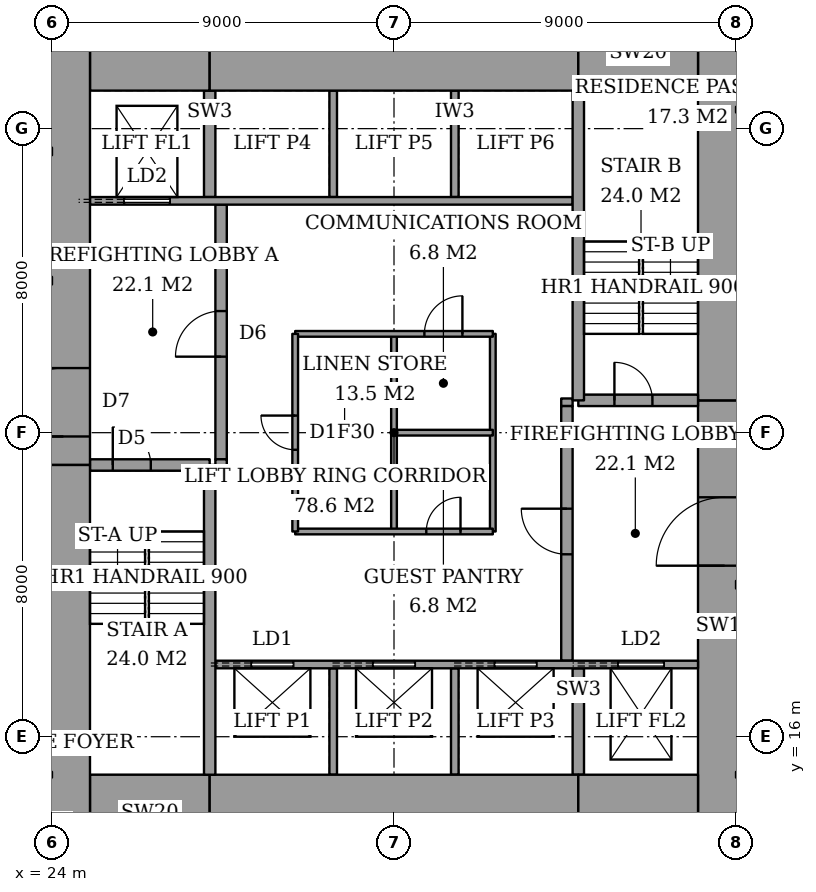
"""IFC4 building model, lengths in metres.
Left out: names, types, materials, properties, quantities, classifications, styles, units other than length and angle.
Written with IfcOpenShell. Run it as: python <this file> out.ifc"""

import sys

from ifc_helpers import new_model, si_unit, direction, frame, frame_2d, origin, place, context, subcontext, project, spatial, rectangle, extrude, element, fill, save


model = new_model("IFC4")
c1 = context("Model", 3, precision=1e-05, world=origin(), true_north=direction((0.0, 1.0)))
c2 = subcontext(c1, "Body", "Model", "MODEL_VIEW")
j1 = project(units=[si_unit("LENGTHUNIT", "METRE"), si_unit("PLANEANGLEUNIT", "RADIAN")], contexts=[c1])
p1 = place(None, origin())
s1 = spatial("IfcSite", under=j1, at=p1, CompositionType="ELEMENT")
p2 = place(p1, origin())
s2 = spatial("IfcBuilding", under=s1, at=p2, CompositionType="ELEMENT")
p3 = place(p2, frame((0.0, 0.0, 72.8)))
s3 = spatial("IfcBuildingStorey", under=s2, at=p3, CompositionType="ELEMENT", Elevation=72.8)
p4 = place(p3, frame((25.0, 14.0, 0.0), z_axis=(0.0, 0.0, 1.0), x_axis=(1.0, 0.0, 0.0)))
e1 = element("IfcWall", 1, at=p4, inside=s3, PredefinedType="SHEAR", context=c2, shape_type="SweptSolid", body=[
    extrude(rectangle(XDim=3.15, YDim=2.0, at=frame_2d((1.575, 0.0))), origin(), (0.0, 0.0, 1.0), 3.6),
])
p5 = place(p3, frame((28.15, 14.0, 0.0), z_axis=(0.0, 0.0, 1.0), x_axis=(1.0, 0.0, 0.0)))
e2 = element("IfcWall", 2, at=p5, inside=s3, PredefinedType="SHEAR", context=c2, shape_type="SweptSolid", body=[
    extrude(rectangle(XDim=9.7, YDim=2.0, at=frame_2d((4.85, 0.0))), origin(), (0.0, 0.0, 1.0), 3.6),
])
for number, where, z_axis, x_axis in (
    (3, (37.85, 14.0, 0.0), (0.0, 0.0, 1.0), (1.0, 0.0, 0.0)),
    (4, (25.0, 34.0, 0.0), (0.0, 0.0, 1.0), (1.0, 0.0, 0.0)),
):
    element("IfcWall", number, at=place(p3, frame(where, z_axis=z_axis, x_axis=x_axis)), inside=s3, PredefinedType="SHEAR", context=c2, shape_type="SweptSolid", body=[
        extrude(rectangle(XDim=3.15, YDim=2.0, at=frame_2d((1.575, 0.0))), origin(), (0.0, 0.0, 1.0), 3.6),
    ])
p6 = place(p3, frame((28.15, 34.0, 0.0), z_axis=(0.0, 0.0, 1.0), x_axis=(1.0, 0.0, 0.0)))
e5 = element("IfcWall", 5, at=p6, inside=s3, PredefinedType="SHEAR", context=c2, shape_type="SweptSolid", body=[
    extrude(rectangle(XDim=9.7, YDim=2.0, at=frame_2d((4.85, 0.0))), origin(), (0.0, 0.0, 1.0), 3.6),
])
p7 = place(p3, frame((37.85, 34.0, 0.0), z_axis=(0.0, 0.0, 1.0), x_axis=(1.0, 0.0, 0.0)))
e6 = element("IfcWall", 6, at=p7, inside=s3, PredefinedType="SHEAR", context=c2, shape_type="SweptSolid", body=[
    extrude(rectangle(XDim=3.15, YDim=2.0, at=frame_2d((1.575, 0.0))), origin(), (0.0, 0.0, 1.0), 3.6),
])
p8 = place(p3, frame((24.3, 13.0, 0.0), z_axis=(0.0, 0.0, 1.0), x_axis=(0.0, 1.0, 0.0)))
e7 = element("IfcWall", 7, at=p8, inside=s3, PredefinedType="SHEAR", context=c2, shape_type="SweptSolid", body=[
    extrude(rectangle(XDim=10.15, YDim=1.4, at=frame_2d((5.075, 0.0))), origin(), (0.0, 0.0, 1.0), 3.6),
])
p9 = place(p3, frame((24.3, 23.15, 0.0), z_axis=(0.0, 0.0, 1.0), x_axis=(0.0, 1.0, 0.0)))
e8 = element("IfcWall", 8, at=p9, inside=s3, PredefinedType="SHEAR", context=c2, shape_type="SweptSolid", body=[
    extrude(rectangle(XDim=11.85, YDim=1.4, at=frame_2d((5.925, 0.0))), origin(), (0.0, 0.0, 1.0), 3.6),
])
p10 = place(p9, frame((0.75, 0.0, 0.0)))
e9 = element("IfcOpeningElement", 9, at=p10, cuts=e8, PredefinedType="OPENING", context=c2, shape_type="SweptSolid", body=[
    extrude(rectangle(XDim=1.8, YDim=2.4, at=frame_2d((0.9, 1.2))), frame((0.0, 0.71, 0.0), z_axis=(0.0, -1.0, 0.0), x_axis=(1.0, 0.0, 0.0)), (0.0, 0.0, 1.0), 1.42),
])
p11 = place(p3, frame((41.7, 13.0, 0.0), z_axis=(0.0, 0.0, 1.0), x_axis=(0.0, 1.0, 0.0)))
e10 = element("IfcWall", 10, at=p11, inside=s3, PredefinedType="SHEAR", context=c2, shape_type="SweptSolid", body=[
    extrude(rectangle(XDim=11.85, YDim=1.4, at=frame_2d((5.925, 0.0))), origin(), (0.0, 0.0, 1.0), 3.6),
])
p12 = place(p11, frame((7.5, 0.0, 0.0)))
e11 = element("IfcOpeningElement", 11, at=p12, cuts=e10, PredefinedType="OPENING", context=c2, shape_type="SweptSolid", body=[
    extrude(rectangle(XDim=1.8, YDim=2.4, at=frame_2d((0.9, 1.2))), frame((0.0, 0.71, 0.0), z_axis=(0.0, -1.0, 0.0), x_axis=(1.0, 0.0, 0.0)), (0.0, 0.0, 1.0), 1.42),
])
p13 = place(p3, frame((41.7, 24.85, 0.0), z_axis=(0.0, 0.0, 1.0), x_axis=(0.0, 1.0, 0.0)))
e12 = element("IfcWall", 12, at=p13, inside=s3, PredefinedType="SHEAR", context=c2, shape_type="SweptSolid", body=[
    extrude(rectangle(XDim=10.15, YDim=1.4, at=frame_2d((5.075, 0.0))), origin(), (0.0, 0.0, 1.0), 3.6),
])
p14 = place(p3, frame((28.15, 15.0, 0.0), z_axis=(0.0, 0.0, 1.0), x_axis=(0.0, 1.0, 0.0)))
e13 = element("IfcWall", 13, at=p14, inside=s3, PredefinedType="SHEAR", context=c2, shape_type="SweptSolid", body=[
    extrude(rectangle(XDim=8.15, YDim=0.3, at=frame_2d((4.075, 0.0))), origin(), (0.0, 0.0, 1.0), 3.6),
])
p15 = place(p3, frame((25.0, 23.15, 0.0), z_axis=(0.0, 0.0, 1.0), x_axis=(1.0, 0.0, 0.0)))
e14 = element("IfcWall", 14, at=p15, inside=s3, PredefinedType="SHEAR", context=c2, shape_type="SweptSolid", body=[
    extrude(rectangle(XDim=3.15, YDim=0.3, at=frame_2d((1.575, 0.0))), origin(), (0.0, 0.0, 1.0), 3.6),
])
p16 = place(p15, frame((0.6, 0.0, 0.0)))
e15 = element("IfcOpeningElement", 15, at=p16, cuts=e14, PredefinedType="OPENING", context=c2, shape_type="SweptSolid", body=[
    extrude(rectangle(XDim=1.0, YDim=2.1, at=frame_2d((0.5, 1.05))), frame((0.0, 0.16, 0.0), z_axis=(0.0, -1.0, 0.0), x_axis=(1.0, 0.0, 0.0)), (0.0, 0.0, 1.0), 0.32),
])
p17 = place(p3, frame((37.85, 24.85, 0.0), z_axis=(0.0, 0.0, 1.0), x_axis=(0.0, 1.0, 0.0)))
e16 = element("IfcWall", 16, at=p17, inside=s3, PredefinedType="SHEAR", context=c2, shape_type="SweptSolid", body=[
    extrude(rectangle(XDim=8.15, YDim=0.3, at=frame_2d((4.075, 0.0))), origin(), (0.0, 0.0, 1.0), 3.6),
])
p18 = place(p3, frame((37.85, 24.85, 0.0), z_axis=(0.0, 0.0, 1.0), x_axis=(1.0, 0.0, 0.0)))
e17 = element("IfcWall", 17, at=p18, inside=s3, PredefinedType="SHEAR", context=c2, shape_type="SweptSolid", body=[
    extrude(rectangle(XDim=3.15, YDim=0.3, at=frame_2d((1.575, 0.0))), origin(), (0.0, 0.0, 1.0), 3.6),
])
p19 = place(p18, frame((0.95, 0.0, 0.0)))
e18 = element("IfcOpeningElement", 18, at=p19, cuts=e17, PredefinedType="OPENING", context=c2, shape_type="SweptSolid", body=[
    extrude(rectangle(XDim=1.0, YDim=2.1, at=frame_2d((0.5, 1.05))), frame((0.0, 0.16, 0.0), z_axis=(0.0, -1.0, 0.0), x_axis=(1.0, 0.0, 0.0)), (0.0, 0.0, 1.0), 0.32),
])
p20 = place(p3, frame((28.45, 23.3, 0.0), z_axis=(0.0, 0.0, 1.0), x_axis=(0.0, 1.0, 0.0)))
e19 = element("IfcWall", 19, at=p20, inside=s3, PredefinedType="PARTITIONING", context=c2, shape_type="SweptSolid", body=[
    extrude(rectangle(XDim=6.7, YDim=0.3, at=frame_2d((3.35, 0.0))), origin(), (0.0, 0.0, 1.0), 3.6),
])
p21 = place(p20, frame((2.7, 0.0, 0.0)))
e20 = element("IfcOpeningElement", 20, at=p21, cuts=e19, PredefinedType="OPENING", context=c2, shape_type="SweptSolid", body=[
    extrude(rectangle(XDim=1.2, YDim=2.1, at=frame_2d((0.6, 1.05))), frame((0.0, 0.16, 0.0), z_axis=(0.0, -1.0, 0.0), x_axis=(1.0, 0.0, 0.0)), (0.0, 0.0, 1.0), 0.32),
])
p22 = place(p3, frame((37.55, 18.0, 0.0), z_axis=(0.0, 0.0, 1.0), x_axis=(0.0, 1.0, 0.0)))
e21 = element("IfcWall", 21, at=p22, inside=s3, PredefinedType="PARTITIONING", context=c2, shape_type="SweptSolid", body=[
    extrude(rectangle(XDim=6.7, YDim=0.3, at=frame_2d((3.35, 0.0))), origin(), (0.0, 0.0, 1.0), 3.6),
])
p23 = place(p22, frame((2.8, 0.0, 0.0)))
e22 = element("IfcOpeningElement", 22, at=p23, cuts=e21, PredefinedType="OPENING", context=c2, shape_type="SweptSolid", body=[
    extrude(rectangle(XDim=1.2, YDim=2.1, at=frame_2d((0.6, 1.05))), frame((0.0, 0.16, 0.0), z_axis=(0.0, -1.0, 0.0), x_axis=(1.0, 0.0, 0.0)), (0.0, 0.0, 1.0), 0.32),
])
p24 = place(p3, frame((28.3, 17.9, 0.0), z_axis=(0.0, 0.0, 1.0), x_axis=(1.0, 0.0, 0.0)))
e23 = element("IfcWall", 23, at=p24, inside=s3, PredefinedType="PARTITIONING", context=c2, shape_type="SweptSolid", body=[
    extrude(rectangle(XDim=12.7, YDim=0.2, at=frame_2d((6.35, 0.0))), origin(), (0.0, 0.0, 1.0), 3.6),
])
p25 = place(p24, frame((0.95, 0.0, 0.0)))
e24 = element("IfcOpeningElement", 24, at=p25, cuts=e23, PredefinedType="OPENING", context=c2, shape_type="SweptSolid", body=[
    extrude(rectangle(XDim=1.1, YDim=2.1, at=frame_2d((0.55, 1.05))), frame((0.0, 0.11, 0.0), z_axis=(0.0, -1.0, 0.0), x_axis=(1.0, 0.0, 0.0)), (0.0, 0.0, 1.0), 0.22),
])
p26 = place(p24, frame((4.15, 0.0, 0.0)))
e25 = element("IfcOpeningElement", 25, at=p26, cuts=e23, PredefinedType="OPENING", context=c2, shape_type="SweptSolid", body=[
    extrude(rectangle(XDim=1.1, YDim=2.1, at=frame_2d((0.55, 1.05))), frame((0.0, 0.11, 0.0), z_axis=(0.0, -1.0, 0.0), x_axis=(1.0, 0.0, 0.0)), (0.0, 0.0, 1.0), 0.22),
])
p27 = place(p24, frame((7.35, 0.0, 0.0)))
e26 = element("IfcOpeningElement", 26, at=p27, cuts=e23, PredefinedType="OPENING", context=c2, shape_type="SweptSolid", body=[
    extrude(rectangle(XDim=1.1, YDim=2.1, at=frame_2d((0.55, 1.05))), frame((0.0, 0.11, 0.0), z_axis=(0.0, -1.0, 0.0), x_axis=(1.0, 0.0, 0.0)), (0.0, 0.0, 1.0), 0.22),
])
p28 = place(p24, frame((10.6, 0.0, 0.0)))
e27 = element("IfcOpeningElement", 27, at=p28, cuts=e23, PredefinedType="OPENING", context=c2, shape_type="SweptSolid", body=[
    extrude(rectangle(XDim=1.2, YDim=2.1, at=frame_2d((0.6, 1.05))), frame((0.0, 0.11, 0.0), z_axis=(0.0, -1.0, 0.0), x_axis=(1.0, 0.0, 0.0)), (0.0, 0.0, 1.0), 0.22),
])
p29 = place(p3, frame((25.0, 30.1, 0.0), z_axis=(0.0, 0.0, 1.0), x_axis=(1.0, 0.0, 0.0)))
e28 = element("IfcWall", 28, at=p29, inside=s3, PredefinedType="PARTITIONING", context=c2, shape_type="SweptSolid", body=[
    extrude(rectangle(XDim=12.7, YDim=0.2, at=frame_2d((6.35, 0.0))), origin(), (0.0, 0.0, 1.0), 3.6),
])
p30 = place(p29, frame((0.9, 0.0, 0.0)))
e29 = element("IfcOpeningElement", 29, at=p30, cuts=e28, PredefinedType="OPENING", context=c2, shape_type="SweptSolid", body=[
    extrude(rectangle(XDim=1.2, YDim=2.1, at=frame_2d((0.6, 1.05))), frame((0.0, 0.11, 0.0), z_axis=(0.0, -1.0, 0.0), x_axis=(1.0, 0.0, 0.0)), (0.0, 0.0, 1.0), 0.22),
])
for number, where, z_axis, x_axis in (
    (30, (31.4, 15.0, 0.0), (0.0, 0.0, 1.0), (0.0, 1.0, 0.0)),
    (31, (34.6, 15.0, 0.0), (0.0, 0.0, 1.0), (0.0, 1.0, 0.0)),
):
    element("IfcWall", number, at=place(p3, frame(where, z_axis=z_axis, x_axis=x_axis)), inside=s3, PredefinedType="PARTITIONING", context=c2, shape_type="SweptSolid", body=[
        extrude(rectangle(XDim=2.8, YDim=0.2, at=frame_2d((1.4, 0.0))), origin(), (0.0, 0.0, 1.0), 3.6),
    ])
p31 = place(p3, frame((37.85, 15.0, 0.0), z_axis=(0.0, 0.0, 1.0), x_axis=(0.0, 1.0, 0.0)))
e32 = element("IfcWall", 32, at=p31, inside=s3, PredefinedType="SHEAR", context=c2, shape_type="SweptSolid", body=[
    extrude(rectangle(XDim=2.8, YDim=0.3, at=frame_2d((1.4, 0.0))), origin(), (0.0, 0.0, 1.0), 3.6),
])
for number, where, z_axis, x_axis in (
    (33, (31.4, 30.2, 0.0), (0.0, 0.0, 1.0), (0.0, 1.0, 0.0)),
    (34, (34.6, 30.2, 0.0), (0.0, 0.0, 1.0), (0.0, 1.0, 0.0)),
):
    element("IfcWall", number, at=place(p3, frame(where, z_axis=z_axis, x_axis=x_axis)), inside=s3, PredefinedType="PARTITIONING", context=c2, shape_type="SweptSolid", body=[
        extrude(rectangle(XDim=2.8, YDim=0.2, at=frame_2d((1.4, 0.0))), origin(), (0.0, 0.0, 1.0), 3.6),
    ])
p32 = place(p3, frame((28.15, 30.2, 0.0), z_axis=(0.0, 0.0, 1.0), x_axis=(0.0, 1.0, 0.0)))
e35 = element("IfcWall", 35, at=p32, inside=s3, PredefinedType="SHEAR", context=c2, shape_type="SweptSolid", body=[
    extrude(rectangle(XDim=2.8, YDim=0.3, at=frame_2d((1.4, 0.0))), origin(), (0.0, 0.0, 1.0), 3.6),
])
for number, where, z_axis, x_axis in (
    (36, (28.3, 23.2, 0.0), (0.0, 0.0, 1.0), (1.0, 0.0, 0.0)),
    (37, (37.4, 24.8, 0.0), (0.0, 0.0, 1.0), (1.0, 0.0, 0.0)),
):
    element("IfcWall", number, at=place(p3, frame(where, z_axis=z_axis, x_axis=x_axis)), inside=s3, PredefinedType="PARTITIONING", context=c2, shape_type="SweptSolid", body=[
        extrude(rectangle(XDim=0.3, YDim=0.2, at=frame_2d((0.15, 0.0))), origin(), (0.0, 0.0, 1.0), 3.6),
    ])
p33 = place(p3, frame((30.4, 21.4, 0.0), z_axis=(0.0, 0.0, 1.0), x_axis=(1.0, 0.0, 0.0)))
e38 = element("IfcWall", 38, at=p33, inside=s3, PredefinedType="PARTITIONING", context=c2, shape_type="SweptSolid", body=[
    extrude(rectangle(XDim=5.2, YDim=0.15, at=frame_2d((2.6, 0.0))), origin(), (0.0, 0.0, 1.0), 3.35),
])
p34 = place(p33, frame((3.45, 0.0, 0.0)))
e39 = element("IfcOpeningElement", 39, at=p34, cuts=e38, PredefinedType="OPENING", context=c2, shape_type="SweptSolid", body=[
    extrude(rectangle(XDim=0.9, YDim=2.1, at=frame_2d((0.45, 1.05))), frame((0.0, 0.085, 0.0), z_axis=(0.0, -1.0, 0.0), x_axis=(1.0, 0.0, 0.0)), (0.0, 0.0, 1.0), 0.17),
])
p35 = place(p3, frame((30.4, 26.6, 0.0), z_axis=(0.0, 0.0, 1.0), x_axis=(1.0, 0.0, 0.0)))
e40 = element("IfcWall", 40, at=p35, inside=s3, PredefinedType="PARTITIONING", context=c2, shape_type="SweptSolid", body=[
    extrude(rectangle(XDim=5.2, YDim=0.15, at=frame_2d((2.6, 0.0))), origin(), (0.0, 0.0, 1.0), 3.35),
])
p36 = place(p35, frame((3.4, 0.0, 0.0)))
e41 = element("IfcOpeningElement", 41, at=p36, cuts=e40, PredefinedType="OPENING", context=c2, shape_type="SweptSolid", body=[
    extrude(rectangle(XDim=1.0, YDim=2.1, at=frame_2d((0.5, 1.05))), frame((0.0, 0.085, 0.0), z_axis=(0.0, -1.0, 0.0), x_axis=(1.0, 0.0, 0.0)), (0.0, 0.0, 1.0), 0.17),
])
p37 = place(p3, frame((30.4, 21.4, 0.0), z_axis=(0.0, 0.0, 1.0), x_axis=(0.0, 1.0, 0.0)))
e42 = element("IfcWall", 42, at=p37, inside=s3, PredefinedType="PARTITIONING", context=c2, shape_type="SweptSolid", body=[
    extrude(rectangle(XDim=5.2, YDim=0.15, at=frame_2d((2.6, 0.0))), origin(), (0.0, 0.0, 1.0), 3.35),
])
p38 = place(p37, frame((2.15, 0.0, 0.0)))
e43 = element("IfcOpeningElement", 43, at=p38, cuts=e42, PredefinedType="OPENING", context=c2, shape_type="SweptSolid", body=[
    extrude(rectangle(XDim=0.9, YDim=2.1, at=frame_2d((0.45, 1.05))), frame((0.0, 0.085, 0.0), z_axis=(0.0, -1.0, 0.0), x_axis=(1.0, 0.0, 0.0)), (0.0, 0.0, 1.0), 0.17),
])
p39 = place(p3, frame((35.6, 21.4, 0.0), z_axis=(0.0, 0.0, 1.0), x_axis=(0.0, 1.0, 0.0)))
e44 = element("IfcWall", 44, at=p39, inside=s3, PredefinedType="PARTITIONING", context=c2, shape_type="SweptSolid", body=[
    extrude(rectangle(XDim=5.2, YDim=0.15, at=frame_2d((2.6, 0.0))), origin(), (0.0, 0.0, 1.0), 3.35),
])
p40 = place(p3, frame((33.0, 24.0, 0.0), z_axis=(0.0, 0.0, 1.0), x_axis=(1.0, 0.0, 0.0)))
e45 = element("IfcWall", 45, at=p40, inside=s3, PredefinedType="PARTITIONING", context=c2, shape_type="SweptSolid", body=[
    extrude(rectangle(XDim=2.6, YDim=0.15, at=frame_2d((1.3, 0.0))), origin(), (0.0, 0.0, 1.0), 3.35),
])
p41 = place(p3, frame((33.0, 21.4, 0.0), z_axis=(0.0, 0.0, 1.0), x_axis=(0.0, 1.0, 0.0)))
e46 = element("IfcWall", 46, at=p41, inside=s3, PredefinedType="PARTITIONING", context=c2, shape_type="SweptSolid", body=[
    extrude(rectangle(XDim=5.2, YDim=0.15, at=frame_2d((2.6, 0.0))), origin(), (0.0, 0.0, 1.0), 3.35),
])
p42 = place(p16, origin())
e47 = element("IfcDoor", 47, at=p42, inside=s3, OperationType="SINGLE_SWING_RIGHT", PredefinedType="DOOR", context=c2, shape_type="SweptSolid", body=[
    extrude(rectangle(XDim=1.0, YDim=2.1, at=frame_2d((0.5, 1.05))), frame((0.0, 0.025, 0.0), z_axis=(0.0, -1.0, 0.0), x_axis=(1.0, 0.0, 0.0)), (0.0, 0.0, 1.0), 0.05),
])
fill(e15, e47)
p43 = place(p19, origin())
e48 = element("IfcDoor", 48, at=p43, inside=s3, OperationType="SINGLE_SWING_RIGHT", PredefinedType="DOOR", context=c2, shape_type="SweptSolid", body=[
    extrude(rectangle(XDim=1.0, YDim=2.1, at=frame_2d((0.5, 1.05))), frame((0.0, 0.025, 0.0), z_axis=(0.0, -1.0, 0.0), x_axis=(1.0, 0.0, 0.0)), (0.0, 0.0, 1.0), 0.05),
])
fill(e18, e48)
p44 = place(p21, origin())
e49 = element("IfcDoor", 49, at=p44, inside=s3, OperationType="SINGLE_SWING_RIGHT", PredefinedType="DOOR", context=c2, shape_type="SweptSolid", body=[
    extrude(rectangle(XDim=1.2, YDim=2.1, at=frame_2d((0.6, 1.05))), frame((0.0, 0.025, 0.0), z_axis=(0.0, -1.0, 0.0), x_axis=(1.0, 0.0, 0.0)), (0.0, 0.0, 1.0), 0.05),
])
fill(e20, e49)
p45 = place(p23, origin())
e50 = element("IfcDoor", 50, at=p45, inside=s3, OperationType="SINGLE_SWING_LEFT", PredefinedType="DOOR", context=c2, shape_type="SweptSolid", body=[
    extrude(rectangle(XDim=1.2, YDim=2.1, at=frame_2d((0.6, 1.05))), frame((0.0, 0.025, 0.0), z_axis=(0.0, -1.0, 0.0), x_axis=(1.0, 0.0, 0.0)), (0.0, 0.0, 1.0), 0.05),
])
fill(e22, e50)
p46 = place(p10, origin())
e51 = element("IfcDoor", 51, at=p46, inside=s3, OperationType="DOUBLE_DOOR_DOUBLE_SWING", PredefinedType="DOOR", context=c2, shape_type="SweptSolid", body=[
    extrude(rectangle(XDim=1.8, YDim=2.4, at=frame_2d((0.9, 1.2))), frame((0.0, 0.025, 0.0), z_axis=(0.0, -1.0, 0.0), x_axis=(1.0, 0.0, 0.0)), (0.0, 0.0, 1.0), 0.05),
])
fill(e9, e51)
p47 = place(p12, origin())
e52 = element("IfcDoor", 52, at=p47, inside=s3, OperationType="DOUBLE_DOOR_DOUBLE_SWING", PredefinedType="DOOR", context=c2, shape_type="SweptSolid", body=[
    extrude(rectangle(XDim=1.8, YDim=2.4, at=frame_2d((0.9, 1.2))), frame((0.0, 0.025, 0.0), z_axis=(0.0, -1.0, 0.0), x_axis=(1.0, 0.0, 0.0)), (0.0, 0.0, 1.0), 0.05),
])
fill(e11, e52)
p48 = place(p38, origin())
e53 = element("IfcDoor", 53, at=p48, inside=s3, OperationType="SINGLE_SWING_LEFT", PredefinedType="DOOR", context=c2, shape_type="SweptSolid", body=[
    extrude(rectangle(XDim=0.9, YDim=2.1, at=frame_2d((0.45, 1.05))), frame((0.0, 0.025, 0.0), z_axis=(0.0, -1.0, 0.0), x_axis=(1.0, 0.0, 0.0)), (0.0, 0.0, 1.0), 0.05),
])
fill(e43, e53)
p49 = place(p34, origin())
e54 = element("IfcDoor", 54, at=p49, inside=s3, OperationType="SINGLE_SWING_LEFT", PredefinedType="DOOR", context=c2, shape_type="SweptSolid", body=[
    extrude(rectangle(XDim=0.9, YDim=2.1, at=frame_2d((0.45, 1.05))), frame((0.0, 0.025, 0.0), z_axis=(0.0, -1.0, 0.0), x_axis=(1.0, 0.0, 0.0)), (0.0, 0.0, 1.0), 0.05),
])
fill(e39, e54)
p50 = place(p36, origin())
e55 = element("IfcDoor", 55, at=p50, inside=s3, OperationType="SINGLE_SWING_LEFT", PredefinedType="DOOR", context=c2, shape_type="SweptSolid", body=[
    extrude(rectangle(XDim=1.0, YDim=2.1, at=frame_2d((0.5, 1.05))), frame((0.0, 0.025, 0.0), z_axis=(0.0, -1.0, 0.0), x_axis=(1.0, 0.0, 0.0)), (0.0, 0.0, 1.0), 0.05),
])
fill(e41, e55)
p51 = place(p25, origin())
e56 = element("IfcDoor", 56, at=p51, inside=s3, OperationType="SLIDING_TO_LEFT", PredefinedType="DOOR", context=c2, shape_type="SweptSolid", body=[
    extrude(rectangle(XDim=1.1, YDim=2.1, at=frame_2d((0.55, 1.05))), frame((0.0, 0.025, 0.0), z_axis=(0.0, -1.0, 0.0), x_axis=(1.0, 0.0, 0.0)), (0.0, 0.0, 1.0), 0.05),
])
fill(e24, e56)
p52 = place(p26, origin())
e57 = element("IfcDoor", 57, at=p52, inside=s3, OperationType="SLIDING_TO_LEFT", PredefinedType="DOOR", context=c2, shape_type="SweptSolid", body=[
    extrude(rectangle(XDim=1.1, YDim=2.1, at=frame_2d((0.55, 1.05))), frame((0.0, 0.025, 0.0), z_axis=(0.0, -1.0, 0.0), x_axis=(1.0, 0.0, 0.0)), (0.0, 0.0, 1.0), 0.05),
])
fill(e25, e57)
p53 = place(p27, origin())
e58 = element("IfcDoor", 58, at=p53, inside=s3, OperationType="SLIDING_TO_LEFT", PredefinedType="DOOR", context=c2, shape_type="SweptSolid", body=[
    extrude(rectangle(XDim=1.1, YDim=2.1, at=frame_2d((0.55, 1.05))), frame((0.0, 0.025, 0.0), z_axis=(0.0, -1.0, 0.0), x_axis=(1.0, 0.0, 0.0)), (0.0, 0.0, 1.0), 0.05),
])
fill(e26, e58)
p54 = place(p30, origin())
e59 = element("IfcDoor", 59, at=p54, inside=s3, OperationType="SLIDING_TO_LEFT", PredefinedType="DOOR", context=c2, shape_type="SweptSolid", body=[
    extrude(rectangle(XDim=1.2, YDim=2.1, at=frame_2d((0.6, 1.05))), frame((0.0, 0.025, 0.0), z_axis=(0.0, -1.0, 0.0), x_axis=(1.0, 0.0, 0.0)), (0.0, 0.0, 1.0), 0.05),
])
fill(e29, e59)
p55 = place(p28, origin())
e60 = element("IfcDoor", 60, at=p55, inside=s3, OperationType="SLIDING_TO_LEFT", PredefinedType="DOOR", context=c2, shape_type="SweptSolid", body=[
    extrude(rectangle(XDim=1.2, YDim=2.1, at=frame_2d((0.6, 1.05))), frame((0.0, 0.025, 0.0), z_axis=(0.0, -1.0, 0.0), x_axis=(1.0, 0.0, 0.0)), (0.0, 0.0, 1.0), 0.05),
])
fill(e27, e60)
save(model, sys.argv[1])
